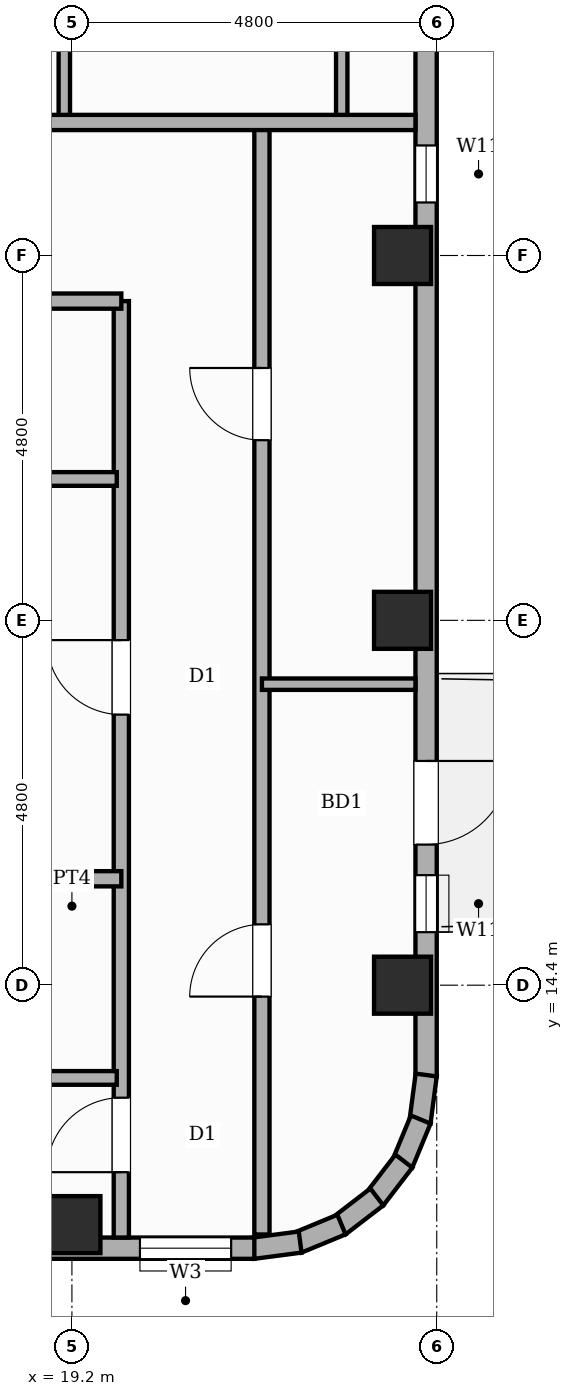
"""IFC4 building model, lengths in metres.
Left out: names, types, materials, properties, quantities, classifications, styles, units other than length and angle.
Written with IfcOpenShell. Run it as: python <this file> out.ifc"""

import sys

from ifc_helpers import new_model, si_unit, direction, frame, frame_2d, origin, origin_2d, place, context, subcontext, project, spatial, rectangle, extrude, element, fill, save


model = new_model("IFC4")
c1 = context("Model", 3, precision=1e-05, world=origin(), true_north=direction((0.0, 1.0)))
c2 = subcontext(c1, "Body", "Model", "MODEL_VIEW")
j1 = project(units=[si_unit("LENGTHUNIT", "METRE"), si_unit("PLANEANGLEUNIT", "RADIAN")], contexts=[c1])
p1 = place(None, origin())
s1 = spatial("IfcSite", under=j1, at=p1, CompositionType="ELEMENT")
p2 = place(p1, origin())
s2 = spatial("IfcBuilding", under=s1, at=p2, CompositionType="ELEMENT")
p3 = place(p2, frame((0.0, 0.0, 278.5)))
s3 = spatial("IfcBuildingStorey", under=s2, at=p3, CompositionType="ELEMENT", Elevation=278.5)
for number, where, z_axis, x_axis in (
    (1, (19.2, 11.25, 0.0), (0.0, 0.0, 1.0), (1.0, 0.0, 0.0)),
    (2, (23.55, 14.4, 0.0), (0.0, 0.0, 1.0), (1.0, 0.0, 0.0)),
    (3, (23.55, 19.2, 0.0), (0.0, 0.0, 1.0), (1.0, 0.0, 0.0)),
    (4, (23.55, 24.0, 0.0), (0.0, 0.0, 1.0), (1.0, 0.0, 0.0)),
):
    element("IfcColumn", number, at=place(p3, frame(where, z_axis=z_axis, x_axis=x_axis)), inside=s3, PredefinedType="COLUMN", context=c2, shape_type="SweptSolid", body=[
        extrude(rectangle(XDim=0.75, YDim=0.75, at=origin_2d()), origin(), (0.0, 0.0, 1.0), 4.3),
    ])
p4 = place(p3, frame((23.86, 45.6, 0.0), z_axis=(0.0, 0.0, 1.0), x_axis=(0.0, -1.0, 0.0)))
e5 = element("IfcWall", 5, at=p4, inside=s3, PredefinedType="STANDARD", context=c2, shape_type="SweptSolid", body=[
    extrude(rectangle(XDim=32.4, YDim=0.28, at=frame_2d((16.2, 0.0))), origin(), (0.0, 0.0, 1.0), 3.32),
])
p5 = place(p4, frame((28.25, 0.0, 0.0)))
e6 = element("IfcOpeningElement", 6, at=p5, cuts=e5, PredefinedType="OPENING", context=c2, shape_type="SweptSolid", body=[
    extrude(rectangle(XDim=1.1, YDim=2.15, at=frame_2d((0.55, 1.075))), frame((0.0, 0.15, 0.0), z_axis=(0.0, -1.0, 0.0), x_axis=(1.0, 0.0, 0.0)), (0.0, 0.0, 1.0), 0.3),
])
p6 = place(p4, frame((29.752, 0.0, 0.45)))
e7 = element("IfcOpeningElement", 7, at=p6, cuts=e5, PredefinedType="OPENING", context=c2, shape_type="SweptSolid", body=[
    extrude(rectangle(XDim=0.75, YDim=1.8, at=frame_2d((0.375, 0.9))), frame((0.0, 0.15, 0.0), z_axis=(0.0, -1.0, 0.0), x_axis=(1.0, 0.0, 0.0)), (0.0, 0.0, 1.0), 0.3),
])
p7 = place(p4, frame((20.153, 0.0, 0.45)))
e8 = element("IfcOpeningElement", 8, at=p7, cuts=e5, PredefinedType="OPENING", context=c2, shape_type="SweptSolid", body=[
    extrude(rectangle(XDim=0.75, YDim=1.8, at=frame_2d((0.375, 0.9))), frame((0.0, 0.15, 0.0), z_axis=(0.0, -1.0, 0.0), x_axis=(1.0, 0.0, 0.0)), (0.0, 0.0, 1.0), 0.3),
])
p8 = place(p4, frame((0.433, 0.0, 0.8)))
e9 = element("IfcOpeningElement", 9, at=p8, cuts=e5, PredefinedType="OPENING", context=c2, shape_type="SweptSolid", body=[
    extrude(rectangle(XDim=1.2, YDim=1.8, at=frame_2d((0.6, 0.9))), frame((0.0, 0.15, 0.0), z_axis=(0.0, -1.0, 0.0), x_axis=(1.0, 0.0, 0.0)), (0.0, 0.0, 1.0), 0.3),
])
p9 = place(p3, frame((23.861, 13.218, 0.0), z_axis=(0.0, 0.0, 1.0), x_axis=(-0.130555323746, -0.9914410257, 0.0)))
e10 = element("IfcWall", 10, at=p9, inside=s3, PredefinedType="STANDARD", context=c2, shape_type="SweptSolid", body=[
    extrude(rectangle(XDim=0.626, YDim=0.28, at=frame_2d((0.313, 0.0))), origin(), (0.0, 0.0, 1.0), 4.04),
])
p10 = place(p3, frame((23.789, 12.632, 0.0), z_axis=(0.0, 0.0, 1.0), x_axis=(-0.382455093999, -0.923974080304, 0.0)))
e11 = element("IfcWall", 11, at=p10, inside=s3, PredefinedType="STANDARD", context=c2, shape_type="SweptSolid", body=[
    extrude(rectangle(XDim=0.626, YDim=0.28, at=frame_2d((0.313, 0.0))), origin(), (0.0, 0.0, 1.0), 4.04),
])
for number, where, z_axis, x_axis in (
    (12, (23.567, 12.085, 0.0), (0.0, 0.0, 1.0), (-0.609, -0.793, 0.0)),
    (13, (23.212, 11.614, 0.0), (0.0, 0.0, 1.0), (-0.793, -0.609, 0.0)),
    (14, (22.746, 11.251, 0.0), (0.0, 0.0, 1.0), (-0.924, -0.383, 0.0)),
    (15, (22.203, 11.021, 0.0), (0.0, 0.0, 1.0), (-0.991, -0.131, 0.0)),
):
    element("IfcWall", number, at=place(p3, frame(where, z_axis=z_axis, x_axis=x_axis)), inside=s3, PredefinedType="STANDARD", context=c2, shape_type="SweptSolid", body=[
        extrude(rectangle(XDim=0.626, YDim=0.28, at=frame_2d((0.313, 0.0))), origin(), (0.0, 0.0, 1.0), 4.04),
    ])
p11 = place(p3, frame((21.6, 10.94, 0.0), z_axis=(0.0, 0.0, 1.0), x_axis=(-1.0, 0.0, 0.0)))
e16 = element("IfcWall", 16, at=p11, inside=s3, PredefinedType="STANDARD", context=c2, shape_type="SweptSolid", body=[
    extrude(rectangle(XDim=3.44, YDim=0.28, at=frame_2d((1.72, 0.0))), origin(), (0.0, 0.0, 1.0), 3.32),
])
p12 = place(p11, frame((0.305, 0.0, 0.8)))
e17 = element("IfcOpeningElement", 17, at=p12, cuts=e16, PredefinedType="OPENING", context=c2, shape_type="SweptSolid", body=[
    extrude(rectangle(XDim=1.2, YDim=1.8, at=frame_2d((0.6, 0.9))), frame((0.0, 0.15, 0.0), z_axis=(0.0, -1.0, 0.0), x_axis=(1.0, 0.0, 0.0)), (0.0, 0.0, 1.0), 0.3),
])
p13 = place(p3, frame((22.75, 25.75, 0.0), z_axis=(0.0, 0.0, 1.0), x_axis=(0.0, 1.0, 0.0)))
e18 = element("IfcWall", 18, at=p13, inside=s3, PredefinedType="PARTITIONING", context=c2, shape_type="SweptSolid", body=[
    extrude(rectangle(XDim=5.15, YDim=0.15, at=frame_2d((2.575, 0.0))), origin(), (0.0, 0.0, 1.0), 4.04),
])
p14 = place(p3, frame((19.1, 25.75, 0.0), z_axis=(0.0, 0.0, 1.0), x_axis=(0.0, 1.0, 0.0)))
e19 = element("IfcWall", 19, at=p14, inside=s3, PredefinedType="PARTITIONING", context=c2, shape_type="SweptSolid", body=[
    extrude(rectangle(XDim=5.15, YDim=0.15, at=frame_2d((2.575, 0.0))), origin(), (0.0, 0.0, 1.0), 4.04),
])
p15 = place(p14, frame((1.2, 0.0, 0.0)))
e20 = element("IfcOpeningElement", 20, at=p15, cuts=e19, PredefinedType="OPENING", context=c2, shape_type="SweptSolid", body=[
    extrude(rectangle(XDim=0.95, YDim=2.15, at=frame_2d((0.475, 1.075))), frame((0.0, 0.085, 0.0), z_axis=(0.0, -1.0, 0.0), x_axis=(1.0, 0.0, 0.0)), (0.0, 0.0, 1.0), 0.17),
])
p16 = place(p3, frame((19.85, 11.08, 0.0), z_axis=(0.0, 0.0, 1.0), x_axis=(0.0, 1.0, 0.0)))
e21 = element("IfcWall", 21, at=p16, inside=s3, PredefinedType="PARTITIONING", context=c2, shape_type="SweptSolid", body=[
    extrude(rectangle(XDim=12.32, YDim=0.2, at=frame_2d((6.16, 0.0))), origin(), (0.0, 0.0, 1.0), 4.04),
])
p17 = place(p16, frame((0.86, 0.0, 0.0)))
e22 = element("IfcOpeningElement", 22, at=p17, cuts=e21, PredefinedType="OPENING", context=c2, shape_type="SweptSolid", body=[
    extrude(rectangle(XDim=0.98, YDim=2.18, at=frame_2d((0.49, 1.09))), frame((0.0, 0.11, 0.0), z_axis=(0.0, -1.0, 0.0), x_axis=(1.0, 0.0, 0.0)), (0.0, 0.0, 1.0), 0.22),
])
p18 = place(p16, frame((6.88, 0.0, 0.0)))
e23 = element("IfcOpeningElement", 23, at=p18, cuts=e21, PredefinedType="OPENING", context=c2, shape_type="SweptSolid", body=[
    extrude(rectangle(XDim=0.98, YDim=2.18, at=frame_2d((0.49, 1.09))), frame((0.0, 0.11, 0.0), z_axis=(0.0, -1.0, 0.0), x_axis=(1.0, 0.0, 0.0)), (0.0, 0.0, 1.0), 0.22),
])
p19 = place(p3, frame((21.7, 11.12, 0.0), z_axis=(0.0, 0.0, 1.0), x_axis=(0.0, 1.0, 0.0)))
e24 = element("IfcWall", 24, at=p19, inside=s3, PredefinedType="PARTITIONING", context=c2, shape_type="SweptSolid", body=[
    extrude(rectangle(XDim=14.63, YDim=0.2, at=frame_2d((7.315, 0.0))), origin(), (0.0, 0.0, 1.0), 4.04),
])
p20 = place(p19, frame((3.13, 0.0, 0.0)))
e25 = element("IfcOpeningElement", 25, at=p20, cuts=e24, PredefinedType="OPENING", context=c2, shape_type="SweptSolid", body=[
    extrude(rectangle(XDim=0.95, YDim=2.15, at=frame_2d((0.475, 1.075))), frame((0.0, 0.11, 0.0), z_axis=(0.0, -1.0, 0.0), x_axis=(1.0, 0.0, 0.0)), (0.0, 0.0, 1.0), 0.22),
])
p21 = place(p19, frame((10.45, 0.0, 0.0)))
e26 = element("IfcOpeningElement", 26, at=p21, cuts=e24, PredefinedType="OPENING", context=c2, shape_type="SweptSolid", body=[
    extrude(rectangle(XDim=0.95, YDim=2.15, at=frame_2d((0.475, 1.075))), frame((0.0, 0.11, 0.0), z_axis=(0.0, -1.0, 0.0), x_axis=(1.0, 0.0, 0.0)), (0.0, 0.0, 1.0), 0.22),
])
p22 = place(p3, frame((5.08, 23.4, 0.0), z_axis=(0.0, 0.0, 1.0), x_axis=(1.0, 0.0, 0.0)))
e27 = element("IfcWall", 27, at=p22, inside=s3, PredefinedType="PARTITIONING", context=c2, shape_type="SweptSolid", body=[
    extrude(rectangle(XDim=14.77, YDim=0.2, at=frame_2d((7.385, 0.0))), origin(), (0.0, 0.0, 1.0), 4.04),
])
p23 = place(p3, frame((15.5, 25.75, 0.0), z_axis=(0.0, 0.0, 1.0), x_axis=(1.0, 0.0, 0.0)))
e28 = element("IfcWall", 28, at=p23, inside=s3, PredefinedType="PARTITIONING", context=c2, shape_type="SweptSolid", body=[
    extrude(rectangle(XDim=8.22, YDim=0.2, at=frame_2d((4.11, 0.0))), origin(), (0.0, 0.0, 1.0), 4.04),
])
p24 = place(p3, frame((5.1, 13.18, 0.0), z_axis=(0.0, 0.0, 1.0), x_axis=(1.0, 0.0, 0.0)))
e29 = element("IfcWall", 29, at=p24, inside=s3, PredefinedType="PLUMBINGWALL", context=c2, shape_type="SweptSolid", body=[
    extrude(rectangle(XDim=14.69, YDim=0.18, at=frame_2d((7.345, 0.0))), origin(), (0.0, 0.0, 1.0), 4.04),
])
p25 = place(p24, frame((3.165, 0.0, 0.0)))
e30 = element("IfcOpeningElement", 30, at=p25, cuts=e29, PredefinedType="OPENING", context=c2, shape_type="SweptSolid", body=[
    extrude(rectangle(XDim=0.86, YDim=2.1, at=frame_2d((0.43, 1.05))), frame((0.0, 0.1, 0.0), z_axis=(0.0, -1.0, 0.0), x_axis=(1.0, 0.0, 0.0)), (0.0, 0.0, 1.0), 0.2),
])
p26 = place(p24, frame((10.58, 0.0, 0.0)))
e31 = element("IfcOpeningElement", 31, at=p26, cuts=e29, PredefinedType="OPENING", context=c2, shape_type="SweptSolid", body=[
    extrude(rectangle(XDim=0.86, YDim=2.1, at=frame_2d((0.43, 1.05))), frame((0.0, 0.1, 0.0), z_axis=(0.0, -1.0, 0.0), x_axis=(1.0, 0.0, 0.0)), (0.0, 0.0, 1.0), 0.2),
])
p27 = place(p3, frame((5.08, 15.8, 0.0), z_axis=(0.0, 0.0, 1.0), x_axis=(1.0, 0.0, 0.0)))
e32 = element("IfcWall", 32, at=p27, inside=s3, PredefinedType="SOLIDWALL", context=c2, shape_type="SweptSolid", body=[
    extrude(rectangle(XDim=14.77, YDim=0.2, at=frame_2d((7.385, 0.0))), origin(), (0.0, 0.0, 1.0), 4.04),
])
p28 = place(p3, frame((5.08, 21.06, 0.0), z_axis=(0.0, 0.0, 1.0), x_axis=(1.0, 0.0, 0.0)))
e33 = element("IfcWall", 33, at=p28, inside=s3, PredefinedType="PLUMBINGWALL", context=c2, shape_type="SweptSolid", body=[
    extrude(rectangle(XDim=14.71, YDim=0.18, at=frame_2d((7.355, 0.0))), origin(), (0.0, 0.0, 1.0), 4.04),
])
p29 = place(p28, frame((2.324, 0.0, 0.0)))
e34 = element("IfcOpeningElement", 34, at=p29, cuts=e33, PredefinedType="OPENING", context=c2, shape_type="SweptSolid", body=[
    extrude(rectangle(XDim=0.9, YDim=2.15, at=frame_2d((0.45, 1.075))), frame((0.0, 0.1, 0.0), z_axis=(0.0, -1.0, 0.0), x_axis=(1.0, 0.0, 0.0)), (0.0, 0.0, 1.0), 0.2),
])
p30 = place(p28, frame((7.948, 0.0, 0.0)))
e35 = element("IfcOpeningElement", 35, at=p30, cuts=e33, PredefinedType="OPENING", context=c2, shape_type="SweptSolid", body=[
    extrude(rectangle(XDim=0.9, YDim=2.15, at=frame_2d((0.45, 1.075))), frame((0.0, 0.1, 0.0), z_axis=(0.0, -1.0, 0.0), x_axis=(1.0, 0.0, 0.0)), (0.0, 0.0, 1.0), 0.2),
])
p31 = place(p28, frame((12.128, 0.0, 0.0)))
e36 = element("IfcOpeningElement", 36, at=p31, cuts=e33, PredefinedType="OPENING", context=c2, shape_type="SweptSolid", body=[
    extrude(rectangle(XDim=0.86, YDim=2.1, at=frame_2d((0.43, 1.05))), frame((0.0, 0.1, 0.0), z_axis=(0.0, -1.0, 0.0), x_axis=(1.0, 0.0, 0.0)), (0.0, 0.0, 1.0), 0.2),
])
p32 = place(p3, frame((21.7, 18.36, 0.0), z_axis=(0.0, 0.0, 1.0), x_axis=(1.0, 0.0, 0.0)))
e37 = element("IfcWall", 37, at=p32, inside=s3, PredefinedType="PARTITIONING", context=c2, shape_type="SweptSolid", body=[
    extrude(rectangle(XDim=2.02, YDim=0.15, at=frame_2d((1.01, 0.0))), origin(), (0.0, 0.0, 1.0), 4.04),
])
p33 = place(p5, origin())
e38 = element("IfcDoor", 38, at=p33, inside=s3, OperationType="SINGLE_SWING_LEFT", PredefinedType="DOOR", context=c2, shape_type="SweptSolid", body=[
    extrude(rectangle(XDim=1.1, YDim=2.15, at=frame_2d((0.55, 1.075))), frame((0.0, 0.025, 0.0), z_axis=(0.0, -1.0, 0.0), x_axis=(1.0, 0.0, 0.0)), (0.0, 0.0, 1.0), 0.05),
])
fill(e6, e38)
p34 = place(p6, origin())
e39 = element("IfcWindow", 39, at=p34, inside=s3, PartitioningType="SINGLE_PANEL", PredefinedType="WINDOW", context=c2, shape_type="SweptSolid", body=[
    extrude(rectangle(XDim=0.75, YDim=1.8, at=frame_2d((0.375, 0.9))), frame((0.0, 0.03, 0.0), z_axis=(0.0, -1.0, 0.0), x_axis=(1.0, 0.0, 0.0)), (0.0, 0.0, 1.0), 0.06),
])
fill(e7, e39)
p35 = place(p7, origin())
e40 = element("IfcWindow", 40, at=p35, inside=s3, PartitioningType="SINGLE_PANEL", PredefinedType="WINDOW", context=c2, shape_type="SweptSolid", body=[
    extrude(rectangle(XDim=0.75, YDim=1.8, at=frame_2d((0.375, 0.9))), frame((0.0, 0.03, 0.0), z_axis=(0.0, -1.0, 0.0), x_axis=(1.0, 0.0, 0.0)), (0.0, 0.0, 1.0), 0.06),
])
fill(e8, e40)
p36 = place(p12, origin())
e41 = element("IfcWindow", 41, at=p36, inside=s3, PartitioningType="SINGLE_PANEL", PredefinedType="WINDOW", context=c2, shape_type="SweptSolid", body=[
    extrude(rectangle(XDim=1.2, YDim=1.8, at=frame_2d((0.6, 0.9))), frame((0.0, 0.03, 0.0), z_axis=(0.0, -1.0, 0.0), x_axis=(1.0, 0.0, 0.0)), (0.0, 0.0, 1.0), 0.06),
])
fill(e17, e41)
p37 = place(p17, origin())
e42 = element("IfcDoor", 42, at=p37, inside=s3, OperationType="SINGLE_SWING_LEFT", PredefinedType="DOOR", context=c2, shape_type="SweptSolid", body=[
    extrude(rectangle(XDim=0.98, YDim=2.18, at=frame_2d((0.49, 1.09))), frame((0.0, 0.025, 0.0), z_axis=(0.0, -1.0, 0.0), x_axis=(1.0, 0.0, 0.0)), (0.0, 0.0, 1.0), 0.05),
])
fill(e22, e42)
p38 = place(p18, origin())
e43 = element("IfcDoor", 43, at=p38, inside=s3, OperationType="SINGLE_SWING_RIGHT", PredefinedType="DOOR", context=c2, shape_type="SweptSolid", body=[
    extrude(rectangle(XDim=0.98, YDim=2.18, at=frame_2d((0.49, 1.09))), frame((0.0, 0.025, 0.0), z_axis=(0.0, -1.0, 0.0), x_axis=(1.0, 0.0, 0.0)), (0.0, 0.0, 1.0), 0.05),
])
fill(e23, e43)
p39 = place(p20, origin())
e44 = element("IfcDoor", 44, at=p39, inside=s3, OperationType="SINGLE_SWING_LEFT", PredefinedType="DOOR", context=c2, shape_type="SweptSolid", body=[
    extrude(rectangle(XDim=0.95, YDim=2.15, at=frame_2d((0.475, 1.075))), frame((0.0, 0.025, 0.0), z_axis=(0.0, -1.0, 0.0), x_axis=(1.0, 0.0, 0.0)), (0.0, 0.0, 1.0), 0.05),
])
fill(e25, e44)
p40 = place(p21, origin())
e45 = element("IfcDoor", 45, at=p40, inside=s3, OperationType="SINGLE_SWING_RIGHT", PredefinedType="DOOR", context=c2, shape_type="SweptSolid", body=[
    extrude(rectangle(XDim=0.95, YDim=2.15, at=frame_2d((0.475, 1.075))), frame((0.0, 0.025, 0.0), z_axis=(0.0, -1.0, 0.0), x_axis=(1.0, 0.0, 0.0)), (0.0, 0.0, 1.0), 0.05),
])
fill(e26, e45)
save(model, sys.argv[1])
